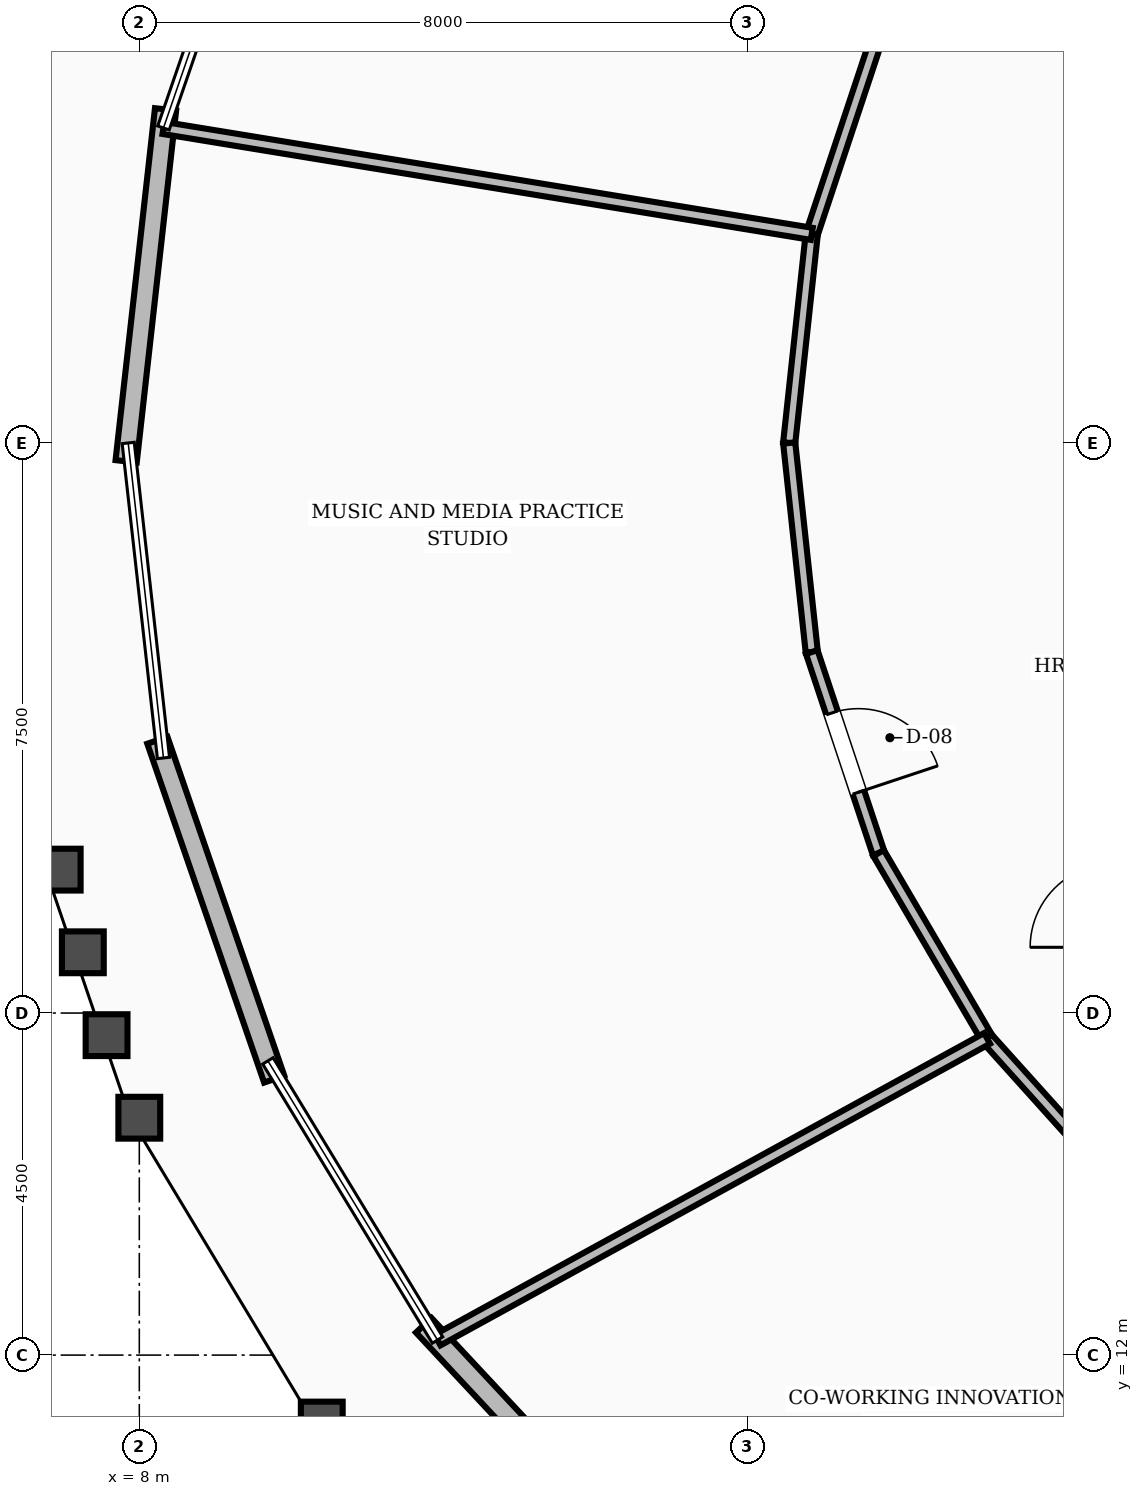
"""IFC4 building model, lengths in metres.
Left out: names, types, materials, properties, quantities, classifications, styles, units other than length and angle.
Written with IfcOpenShell. Run it as: python <this file> out.ifc"""

import sys

from ifc_helpers import new_model, si_unit, direction, frame, frame_2d, origin, place, context, subcontext, project, spatial, rectangle, extrude, element, fill, save


model = new_model("IFC4")
c1 = context("Model", 3, precision=1e-05, world=origin(), true_north=direction((0.0, 1.0)))
c2 = subcontext(c1, "Body", "Model", "MODEL_VIEW")
j1 = project(units=[si_unit("LENGTHUNIT", "METRE"), si_unit("PLANEANGLEUNIT", "RADIAN")], contexts=[c1])
p1 = place(None, origin())
s1 = spatial("IfcSite", under=j1, at=p1, CompositionType="ELEMENT")
p2 = place(p1, origin())
s2 = spatial("IfcBuilding", under=s1, at=p2, CompositionType="ELEMENT")
p3 = place(p2, frame((0.0, 0.0, 203.6)))
s3 = spatial("IfcBuildingStorey", under=s2, at=p3, CompositionType="ELEMENT", Elevation=203.6)
p4 = place(p3, frame((8.345, 28.389, 0.0), z_axis=(0.0, 0.0, 1.0), x_axis=(-0.111236598317, -0.993793952082, 0.0)))
e1 = element("IfcWall", 1, at=p4, inside=s3, PredefinedType="STANDARD", context=c2, shape_type="SweptSolid", body=[
    extrude(rectangle(XDim=4.659, YDim=0.28, at=frame_2d((2.33, 0.0))), origin(), (0.0, 0.0, 1.0), 3.71),
])
p5 = place(p3, frame((8.238, 20.088, 0.0), z_axis=(0.0, 0.0, 1.0), x_axis=(0.325950789295, -0.945386737244, 0.0)))
e2 = element("IfcWall", 2, at=p5, inside=s3, PredefinedType="STANDARD", context=c2, shape_type="SweptSolid", body=[
    extrude(rectangle(XDim=4.715, YDim=0.28, at=frame_2d((2.357, 0.0))), origin(), (0.0, 0.0, 1.0), 3.71),
])
p6 = place(p3, frame((11.742, 12.392, 0.0), z_axis=(0.0, 0.0, 1.0), x_axis=(0.682128325962, -0.731232484864, 0.0)))
e3 = element("IfcWall", 3, at=p6, inside=s3, PredefinedType="STANDARD", context=c2, shape_type="SweptSolid", body=[
    extrude(rectangle(XDim=4.947, YDim=0.28, at=frame_2d((2.474, 0.0))), origin(), (0.0, 0.0, 1.0), 3.71),
])
p7 = place(p3, frame((17.726, 29.396, 0.0), z_axis=(0.0, 0.0, 1.0), x_axis=(-0.315413058649, -0.948954478589, 0.0)))
e4 = element("IfcWall", 4, at=p7, inside=s3, PredefinedType="SOLIDWALL", context=c2, shape_type="SweptSolid", body=[
    extrude(rectangle(XDim=2.787, YDim=0.16, at=frame_2d((1.394, 0.0))), origin(), (0.0, 0.0, 1.0), 3.71),
])
for number, where, z_axis, x_axis in (
    (5, (16.847, 26.751, 0.0), (0.0, 0.0, 1.0), (-0.107, -0.994, 0.0)),
    (6, (16.55, 24.0, 0.0), (0.0, 0.0, 1.0), (0.107, -0.994, 0.0)),
):
    element("IfcWall", number, at=place(p3, frame(where, z_axis=z_axis, x_axis=x_axis)), inside=s3, PredefinedType="SOLIDWALL", context=c2, shape_type="SweptSolid", body=[
        extrude(rectangle(XDim=2.767, YDim=0.16, at=frame_2d((1.383, 0.0))), origin(), (0.0, 0.0, 1.0), 3.71),
    ])
p8 = place(p3, frame((16.847, 21.249, 0.0), z_axis=(0.0, 0.0, 1.0), x_axis=(0.315413058649, -0.948954478589, 0.0)))
e7 = element("IfcWall", 7, at=p8, inside=s3, PredefinedType="SOLIDWALL", context=c2, shape_type="SweptSolid", body=[
    extrude(rectangle(XDim=2.787, YDim=0.16, at=frame_2d((1.394, 0.0))), origin(), (0.0, 0.0, 1.0), 3.71),
])
p9 = place(p8, frame((0.844, 0.0, 0.0)))
e8 = element("IfcOpeningElement", 8, at=p9, cuts=e7, PredefinedType="OPENING", context=c2, shape_type="SweptSolid", body=[
    extrude(rectangle(XDim=1.1, YDim=2.1, at=frame_2d((0.55, 1.05))), frame((0.0, 0.09, 0.0), z_axis=(0.0, -1.0, 0.0), x_axis=(1.0, 0.0, 0.0)), (0.0, 0.0, 1.0), 0.18),
])
p10 = place(p3, frame((17.726, 18.604, 0.0), z_axis=(0.0, 0.0, 1.0), x_axis=(0.505380130961, -0.862896820732, 0.0)))
e9 = element("IfcWall", 9, at=p10, inside=s3, PredefinedType="SOLIDWALL", context=c2, shape_type="SweptSolid", body=[
    extrude(rectangle(XDim=2.825, YDim=0.16, at=frame_2d((1.413, 0.0))), origin(), (0.0, 0.0, 1.0), 3.71),
])
p11 = place(p3, frame((19.154, 16.167, 0.0), z_axis=(0.0, 0.0, 1.0), x_axis=(0.668645478294, -0.743581350194, 0.0)))
e10 = element("IfcWall", 10, at=p11, inside=s3, PredefinedType="SOLIDWALL", context=c2, shape_type="SweptSolid", body=[
    extrude(rectangle(XDim=2.874, YDim=0.16, at=frame_2d((1.437, 0.0))), origin(), (0.0, 0.0, 1.0), 3.71),
])
p12 = place(p3, frame((16.847, 26.751, 0.0), z_axis=(0.0, 0.0, 1.0), x_axis=(-0.986913436685, 0.161250948808, 0.0)))
e11 = element("IfcWall", 11, at=p12, inside=s3, PredefinedType="SOLIDWALL", context=c2, shape_type="SweptSolid", body=[
    extrude(rectangle(XDim=8.642, YDim=0.16, at=frame_2d((4.321, 0.0))), origin(), (0.0, 0.0, 1.0), 3.71),
])
p13 = place(p3, frame((19.154, 16.167, 0.0), z_axis=(0.0, 0.0, 1.0), x_axis=(-0.876638041694, -0.481150437862, 0.0)))
e12 = element("IfcWall", 12, at=p13, inside=s3, PredefinedType="SOLIDWALL", context=c2, shape_type="SweptSolid", body=[
    extrude(rectangle(XDim=8.248, YDim=0.16, at=frame_2d((4.124, 0.0))), origin(), (0.0, 0.0, 1.0), 3.71),
])
p14 = place(p9, origin())
e13 = element("IfcDoor", 13, at=p14, inside=s3, OperationType="SINGLE_SWING_RIGHT", PredefinedType="DOOR", context=c2, shape_type="SweptSolid", body=[
    extrude(rectangle(XDim=1.1, YDim=2.1, at=frame_2d((0.55, 1.05))), frame((0.0, 0.025, 0.0), z_axis=(0.0, -1.0, 0.0), x_axis=(1.0, 0.0, 0.0)), (0.0, 0.0, 1.0), 0.05),
])
fill(e8, e13)
save(model, sys.argv[1])
